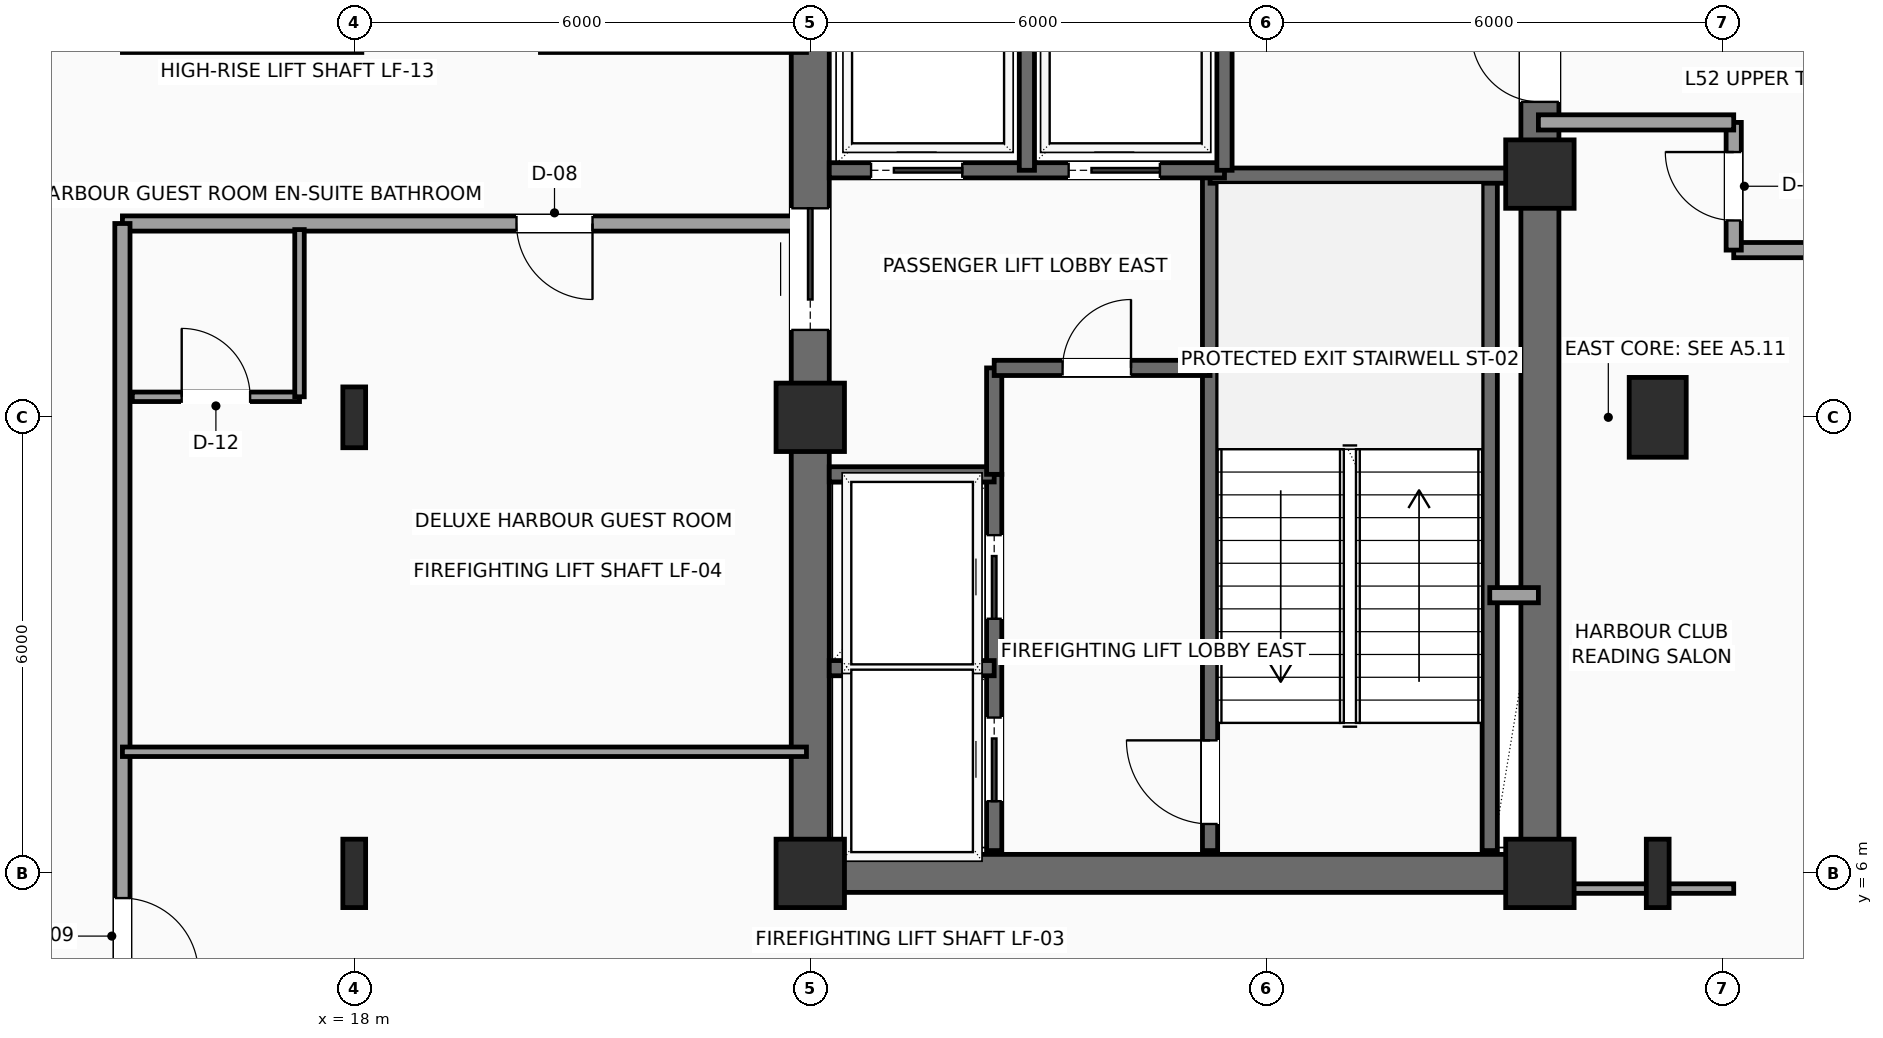
"""IFC4 building model, lengths in metres.
Left out: names, types, materials, properties, quantities, classifications, styles, units other than length and angle.
Written with IfcOpenShell. Run it as: python <this file> out.ifc"""

import sys

from ifc_helpers import new_model, si_unit, direction, frame, frame_2d, origin, origin_2d, place, context, subcontext, project, spatial, rectangle, i_section, extrude, element, fill, save


model = new_model("IFC4")
c1 = context("Model", 3, precision=1e-05, world=origin(), true_north=direction((0.0, 1.0)))
c2 = subcontext(c1, "Body", "Model", "MODEL_VIEW")
j1 = project(units=[si_unit("LENGTHUNIT", "METRE"), si_unit("PLANEANGLEUNIT", "RADIAN")], contexts=[c1])
p1 = place(None, origin())
s1 = spatial("IfcSite", under=j1, at=p1, CompositionType="ELEMENT")
p2 = place(p1, origin())
s2 = spatial("IfcBuilding", under=s1, at=p2, CompositionType="ELEMENT")
p3 = place(p2, frame((0.0, 0.0, 212.4)))
s3 = spatial("IfcBuildingStorey", under=s2, at=p3, CompositionType="ELEMENT", Elevation=212.4)
for number, where, z_axis, x_axis in (
    (1, (24.0, 6.0, 0.0), (0.0, 0.0, 1.0), (1.0, 0.0, 0.0)),
    (2, (24.0, 12.0, 0.0), (0.0, 0.0, 1.0), (1.0, 0.0, 0.0)),
    (3, (33.6, 6.0, 0.0), (0.0, 0.0, 1.0), (1.0, 0.0, 0.0)),
    (4, (33.6, 15.2, 0.0), (0.0, 0.0, 1.0), (1.0, 0.0, 0.0)),
):
    element("IfcColumn", number, at=place(p3, frame(where, z_axis=z_axis, x_axis=x_axis)), inside=s3, PredefinedType="COLUMN", context=c2, shape_type="SweptSolid", body=[
        extrude(rectangle(XDim=0.9, YDim=0.9, at=origin_2d()), origin(), (0.0, 0.0, 1.0), 3.75),
    ])
p4 = place(p3, frame((18.0, 6.0, 0.0), z_axis=(0.0, 0.0, 1.0), x_axis=(1.0, 0.0, 0.0)))
e5 = element("IfcColumn", 5, at=p4, inside=s3, PredefinedType="COLUMN", context=c2, shape_type="SweptSolid", body=[
    extrude(i_section(OverallWidth=0.3, OverallDepth=0.9, WebThickness=0.019, FlangeThickness=0.035, FilletRadius=0.03, at=origin_2d()), origin(), (0.0, 0.0, 1.0), 3.75),
])
p5 = place(p3, frame((18.0, 12.0, 0.0), z_axis=(0.0, 0.0, 1.0), x_axis=(1.0, 0.0, 0.0)))
e6 = element("IfcColumn", 6, at=p5, inside=s3, PredefinedType="COLUMN", context=c2, shape_type="SweptSolid", body=[
    extrude(i_section(OverallWidth=0.3, OverallDepth=0.8, WebThickness=0.018, FlangeThickness=0.033, FilletRadius=0.03, at=origin_2d()), origin(), (0.0, 0.0, 1.0), 3.75),
])
p6 = place(p3, frame((35.15, 6.0, 0.0), z_axis=(0.0, 0.0, 1.0), x_axis=(1.0, 0.0, 0.0)))
e7 = element("IfcColumn", 7, at=p6, inside=s3, PredefinedType="COLUMN", context=c2, shape_type="SweptSolid", body=[
    extrude(i_section(OverallWidth=0.3, OverallDepth=0.9, WebThickness=0.019, FlangeThickness=0.035, FilletRadius=0.03, at=origin_2d()), origin(), (0.0, 0.0, 1.0), 3.75),
])
p7 = place(p3, frame((35.15, 12.0, 0.0), z_axis=(0.0, 0.0, 1.0), x_axis=(1.0, 0.0, 0.0)))
e8 = element("IfcColumn", 8, at=p7, inside=s3, PredefinedType="COLUMN", context=c2, shape_type="SweptSolid", body=[
    extrude(rectangle(XDim=0.75, YDim=1.05, at=origin_2d()), origin(), (0.0, 0.0, 1.0), 3.75),
])
p8 = place(p3, frame((24.0, 6.0, 0.0), z_axis=(0.0, 0.0, 1.0), x_axis=(1.0, 0.0, 0.0)))
e9 = element("IfcWall", 9, at=p8, inside=s3, PredefinedType="SHEAR", context=c2, shape_type="SweptSolid", body=[
    extrude(rectangle(XDim=9.6, YDim=0.5, at=frame_2d((4.8, 0.0))), origin(), (0.0, 0.0, 1.0), 3.54),
])
p9 = place(p3, frame((24.0, 6.0, 0.0), z_axis=(0.0, 0.0, 1.0), x_axis=(0.0, 1.0, 0.0)))
e10 = element("IfcWall", 10, at=p9, inside=s3, PredefinedType="SHEAR", context=c2, shape_type="SweptSolid", body=[
    extrude(rectangle(XDim=12.0, YDim=0.5, at=frame_2d((6.0, 0.0))), origin(), (0.0, 0.0, 1.0), 3.54),
])
p10 = place(p9, frame((7.15, 0.0, 0.0)))
e11 = element("IfcOpeningElement", 11, at=p10, cuts=e10, PredefinedType="OPENING", context=c2, shape_type="SweptSolid", body=[
    extrude(rectangle(XDim=1.6, YDim=2.3, at=frame_2d((0.8, 1.15))), frame((0.0, 0.26, 0.0), z_axis=(0.0, -1.0, 0.0), x_axis=(1.0, 0.0, 0.0)), (0.0, 0.0, 1.0), 0.52),
])
p11 = place(p3, frame((33.6, 6.0, 0.0), z_axis=(0.0, 0.0, 1.0), x_axis=(0.0, 1.0, 0.0)))
e12 = element("IfcWall", 12, at=p11, inside=s3, PredefinedType="SHEAR", context=c2, shape_type="SweptSolid", body=[
    extrude(rectangle(XDim=12.0, YDim=0.5, at=frame_2d((6.0, 0.0))), origin(), (0.0, 0.0, 1.0), 3.54),
])
p12 = place(p11, frame((10.15, 0.0, 0.0)))
e13 = element("IfcOpeningElement", 13, at=p12, cuts=e12, PredefinedType="OPENING", context=c2, shape_type="SweptSolid", body=[
    extrude(rectangle(XDim=0.9, YDim=2.15, at=frame_2d((0.45, 1.075))), frame((0.0, 0.26, 0.0), z_axis=(0.0, -1.0, 0.0), x_axis=(1.0, 0.0, 0.0)), (0.0, 0.0, 1.0), 0.52),
])
p13 = place(p3, frame((29.26, 6.3, 0.0), z_axis=(0.0, 0.0, 1.0), x_axis=(0.0, 1.0, 0.0)))
e14 = element("IfcWall", 14, at=p13, inside=s3, PredefinedType="SHEAR", context=c2, shape_type="SweptSolid", body=[
    extrude(rectangle(XDim=8.88, YDim=0.2, at=frame_2d((4.44, 0.0))), origin(), (0.0, 0.0, 1.0), 3.54),
])
p14 = place(p13, frame((0.35, 0.0, 0.0)))
e15 = element("IfcOpeningElement", 15, at=p14, cuts=e14, PredefinedType="OPENING", context=c2, shape_type="SweptSolid", body=[
    extrude(rectangle(XDim=1.1, YDim=2.2, at=frame_2d((0.55, 1.1))), frame((0.0, 0.11, 0.0), z_axis=(0.0, -1.0, 0.0), x_axis=(1.0, 0.0, 0.0)), (0.0, 0.0, 1.0), 0.22),
])
p15 = place(p3, frame((32.94, 6.3, 0.0), z_axis=(0.0, 0.0, 1.0), x_axis=(0.0, 1.0, 0.0)))
e16 = element("IfcWall", 16, at=p15, inside=s3, PredefinedType="SHEAR", context=c2, shape_type="SweptSolid", body=[
    extrude(rectangle(XDim=8.88, YDim=0.2, at=frame_2d((4.44, 0.0))), origin(), (0.0, 0.0, 1.0), 3.54),
])
p16 = place(p3, frame((29.26, 15.18, 0.0), z_axis=(0.0, 0.0, 1.0), x_axis=(1.0, 0.0, 0.0)))
e17 = element("IfcWall", 17, at=p16, inside=s3, PredefinedType="SHEAR", context=c2, shape_type="SweptSolid", body=[
    extrude(rectangle(XDim=4.04, YDim=0.2, at=frame_2d((2.02, 0.0))), origin(), (0.0, 0.0, 1.0), 3.54),
])
p17 = place(p3, frame((26.42, 6.3, 0.0), z_axis=(0.0, 0.0, 1.0), x_axis=(0.0, 1.0, 0.0)))
e18 = element("IfcWall", 18, at=p17, inside=s3, PredefinedType="SHEAR", context=c2, shape_type="SweptSolid", body=[
    extrude(rectangle(XDim=4.95, YDim=0.2, at=frame_2d((2.475, 0.0))), origin(), (0.0, 0.0, 1.0), 3.54),
])
p18 = place(p17, frame((0.65, 0.0, 0.0)))
e19 = element("IfcOpeningElement", 19, at=p18, cuts=e18, PredefinedType="OPENING", context=c2, shape_type="SweptSolid", body=[
    extrude(rectangle(XDim=1.1, YDim=2.2, at=frame_2d((0.55, 1.1))), frame((0.0, 0.11, 0.0), z_axis=(0.0, -1.0, 0.0), x_axis=(1.0, 0.0, 0.0)), (0.0, 0.0, 1.0), 0.22),
])
p19 = place(p17, frame((3.05, 0.0, 0.0)))
e20 = element("IfcOpeningElement", 20, at=p19, cuts=e18, PredefinedType="OPENING", context=c2, shape_type="SweptSolid", body=[
    extrude(rectangle(XDim=1.1, YDim=2.2, at=frame_2d((0.55, 1.1))), frame((0.0, 0.11, 0.0), z_axis=(0.0, -1.0, 0.0), x_axis=(1.0, 0.0, 0.0)), (0.0, 0.0, 1.0), 0.22),
])
for number, where, z_axis, x_axis in (
    (21, (24.25, 8.7, 0.0), (0.0, 0.0, 1.0), (1.0, 0.0, 0.0)),
    (22, (24.25, 11.25, 0.0), (0.0, 0.0, 1.0), (1.0, 0.0, 0.0)),
):
    element("IfcWall", number, at=place(p3, frame(where, z_axis=z_axis, x_axis=x_axis)), inside=s3, PredefinedType="SHEAR", context=c2, shape_type="SweptSolid", body=[
        extrude(rectangle(XDim=2.17, YDim=0.2, at=frame_2d((1.085, 0.0))), origin(), (0.0, 0.0, 1.0), 3.54),
    ])
p20 = place(p3, frame((26.42, 11.25, 0.0), z_axis=(0.0, 0.0, 1.0), x_axis=(0.0, 1.0, 0.0)))
e23 = element("IfcWall", 23, at=p20, inside=s3, PredefinedType="SHEAR", context=c2, shape_type="SweptSolid", body=[
    extrude(rectangle(XDim=1.4, YDim=0.2, at=frame_2d((0.7, 0.0))), origin(), (0.0, 0.0, 1.0), 3.54),
])
p21 = place(p3, frame((26.42, 12.65, 0.0), z_axis=(0.0, 0.0, 1.0), x_axis=(1.0, 0.0, 0.0)))
e24 = element("IfcWall", 24, at=p21, inside=s3, PredefinedType="SHEAR", context=c2, shape_type="SweptSolid", body=[
    extrude(rectangle(XDim=2.84, YDim=0.2, at=frame_2d((1.42, 0.0))), origin(), (0.0, 0.0, 1.0), 3.54),
])
p22 = place(p21, frame((0.9, 0.0, 0.0)))
e25 = element("IfcOpeningElement", 25, at=p22, cuts=e24, PredefinedType="OPENING", context=c2, shape_type="SweptSolid", body=[
    extrude(rectangle(XDim=0.9, YDim=2.15, at=frame_2d((0.45, 1.075))), frame((0.0, 0.11, 0.0), z_axis=(0.0, -1.0, 0.0), x_axis=(1.0, 0.0, 0.0)), (0.0, 0.0, 1.0), 0.22),
])
p23 = place(p3, frame((32.94, 9.66, 0.0), z_axis=(0.0, 0.0, 1.0), x_axis=(1.0, 0.0, 0.0)))
e26 = element("IfcWall", 26, at=p23, inside=s3, PredefinedType="SOLIDWALL", context=c2, shape_type="SweptSolid", body=[
    extrude(rectangle(XDim=0.64, YDim=0.2, at=frame_2d((0.32, 0.0))), origin(), (0.0, 0.0, 1.0), 3.54),
])
p24 = place(p3, frame((24.25, 15.25, 0.0), z_axis=(0.0, 0.0, 1.0), x_axis=(1.0, 0.0, 0.0)))
e27 = element("IfcWall", 27, at=p24, inside=s3, PredefinedType="SHEAR", context=c2, shape_type="SweptSolid", body=[
    extrude(rectangle(XDim=5.2, YDim=0.2, at=frame_2d((2.6, 0.0))), origin(), (0.0, 0.0, 1.0), 3.54),
])
p25 = place(p24, frame((0.55, 0.0, 0.0)))
e28 = element("IfcOpeningElement", 28, at=p25, cuts=e27, PredefinedType="OPENING", context=c2, shape_type="SweptSolid", body=[
    extrude(rectangle(XDim=1.2, YDim=2.2, at=frame_2d((0.6, 1.1))), frame((0.0, 0.11, 0.0), z_axis=(0.0, -1.0, 0.0), x_axis=(1.0, 0.0, 0.0)), (0.0, 0.0, 1.0), 0.22),
])
p26 = place(p24, frame((3.15, 0.0, 0.0)))
e29 = element("IfcOpeningElement", 29, at=p26, cuts=e27, PredefinedType="OPENING", context=c2, shape_type="SweptSolid", body=[
    extrude(rectangle(XDim=1.2, YDim=2.2, at=frame_2d((0.6, 1.1))), frame((0.0, 0.11, 0.0), z_axis=(0.0, -1.0, 0.0), x_axis=(1.0, 0.0, 0.0)), (0.0, 0.0, 1.0), 0.22),
])
p27 = place(p3, frame((26.85, 15.25, 0.0), z_axis=(0.0, 0.0, 1.0), x_axis=(0.0, 1.0, 0.0)))
e30 = element("IfcWall", 30, at=p27, inside=s3, PredefinedType="SHEAR", context=c2, shape_type="SweptSolid", body=[
    extrude(rectangle(XDim=2.4, YDim=0.2, at=frame_2d((1.2, 0.0))), origin(), (0.0, 0.0, 1.0), 3.54),
])
p28 = place(p3, frame((29.45, 15.25, 0.0), z_axis=(0.0, 0.0, 1.0), x_axis=(0.0, 1.0, 0.0)))
e31 = element("IfcWall", 31, at=p28, inside=s3, PredefinedType="SHEAR", context=c2, shape_type="SweptSolid", body=[
    extrude(rectangle(XDim=2.45, YDim=0.2, at=frame_2d((1.225, 0.0))), origin(), (0.0, 0.0, 1.0), 3.54),
])
p29 = place(p3, frame((14.95, 16.9, 0.0), z_axis=(0.0, 0.0, 1.0), x_axis=(1.0, 0.0, 0.0)))
e32 = element("IfcWall", 32, at=p29, inside=s3, PredefinedType="PARTITIONING", context=c2, shape_type="SweptSolid", body=[
    extrude(rectangle(XDim=3.15, YDim=0.2, at=frame_2d((1.575, 0.0))), origin(), (0.0, 0.0, 1.0), 3.54),
])
p30 = place(p3, frame((38.55, 14.2, 0.0), z_axis=(0.0, 0.0, 1.0), x_axis=(-1.0, 0.0, 0.0)))
e33 = element("IfcWall", 33, at=p30, inside=s3, PredefinedType="PARTITIONING", context=c2, shape_type="SweptSolid", body=[
    extrude(rectangle(XDim=2.4, YDim=0.2, at=frame_2d((1.2, 0.0))), origin(), (0.0, 0.0, 1.0), 3.54),
])
p31 = place(p3, frame((36.15, 14.2, 0.0), z_axis=(0.0, 0.0, 1.0), x_axis=(0.0, 1.0, 0.0)))
e34 = element("IfcWall", 34, at=p31, inside=s3, PredefinedType="PARTITIONING", context=c2, shape_type="SweptSolid", body=[
    extrude(rectangle(XDim=1.68, YDim=0.2, at=frame_2d((0.84, 0.0))), origin(), (0.0, 0.0, 1.0), 3.54),
])
p32 = place(p31, frame((0.39, 0.0, 0.0)))
e35 = element("IfcOpeningElement", 35, at=p32, cuts=e34, PredefinedType="OPENING", context=c2, shape_type="SweptSolid", body=[
    extrude(rectangle(XDim=0.9, YDim=2.1, at=frame_2d((0.45, 1.05))), frame((0.0, 0.11, 0.0), z_axis=(0.0, -1.0, 0.0), x_axis=(1.0, 0.0, 0.0)), (0.0, 0.0, 1.0), 0.22),
])
p33 = place(p3, frame((36.15, 15.88, 0.0), z_axis=(0.0, 0.0, 1.0), x_axis=(-1.0, 0.0, 0.0)))
e36 = element("IfcWall", 36, at=p33, inside=s3, PredefinedType="PARTITIONING", context=c2, shape_type="SweptSolid", body=[
    extrude(rectangle(XDim=2.57, YDim=0.2, at=frame_2d((1.285, 0.0))), origin(), (0.0, 0.0, 1.0), 3.54),
])
p34 = place(p3, frame((20.45, 16.9, 0.0), z_axis=(0.0, 0.0, 1.0), x_axis=(1.0, 0.0, 0.0)))
e37 = element("IfcWall", 37, at=p34, inside=s3, PredefinedType="PARTITIONING", context=c2, shape_type="SweptSolid", body=[
    extrude(rectangle(XDim=3.5, YDim=0.2, at=frame_2d((1.75, 0.0))), origin(), (0.0, 0.0, 1.0), 3.54),
])
p35 = place(p3, frame((23.95, 14.55, 0.0), z_axis=(0.0, 0.0, 1.0), x_axis=(-1.0, 0.0, 0.0)))
e38 = element("IfcWall", 38, at=p35, inside=s3, PredefinedType="PARTITIONING", context=c2, shape_type="SweptSolid", body=[
    extrude(rectangle(XDim=9.0, YDim=0.2, at=frame_2d((4.5, 0.0))), origin(), (0.0, 0.0, 1.0), 3.54),
])
p36 = place(p35, frame((2.815, 0.0, 0.0)))
e39 = element("IfcOpeningElement", 39, at=p36, cuts=e38, PredefinedType="OPENING", context=c2, shape_type="SweptSolid", body=[
    extrude(rectangle(XDim=1.0, YDim=2.2, at=frame_2d((0.5, 1.1))), frame((0.0, 0.11, 0.0), z_axis=(0.0, -1.0, 0.0), x_axis=(1.0, 0.0, 0.0)), (0.0, 0.0, 1.0), 0.22),
])
p37 = place(p3, frame((14.95, 14.55, 0.0), z_axis=(0.0, 0.0, 1.0), x_axis=(0.0, -1.0, 0.0)))
e40 = element("IfcWall", 40, at=p37, inside=s3, PredefinedType="PARTITIONING", context=c2, shape_type="SweptSolid", body=[
    extrude(rectangle(XDim=12.75, YDim=0.2, at=frame_2d((6.375, 0.0))), origin(), (0.0, 0.0, 1.0), 3.54),
])
p38 = place(p37, frame((8.875, 0.0, 0.0)))
e41 = element("IfcOpeningElement", 41, at=p38, cuts=e40, PredefinedType="OPENING", context=c2, shape_type="SweptSolid", body=[
    extrude(rectangle(XDim=1.0, YDim=2.2, at=frame_2d((0.5, 1.1))), frame((0.0, 0.11, 0.0), z_axis=(0.0, -1.0, 0.0), x_axis=(1.0, 0.0, 0.0)), (0.0, 0.0, 1.0), 0.22),
])
p39 = place(p3, frame((33.65, 5.8, 0.0), z_axis=(0.0, 0.0, 1.0), x_axis=(1.0, 0.0, 0.0)))
e42 = element("IfcWall", 42, at=p39, inside=s3, PredefinedType="PARTITIONING", context=c2, shape_type="SweptSolid", body=[
    extrude(rectangle(XDim=2.5, YDim=0.125, at=frame_2d((1.25, 0.0))), origin(), (0.0, 0.0, 1.0), 3.132),
])
p40 = place(p3, frame((14.95, 7.6, 0.0), z_axis=(0.0, 0.0, 1.0), x_axis=(1.0, 0.0, 0.0)))
e43 = element("IfcWall", 43, at=p40, inside=s3, PredefinedType="PARTITIONING", context=c2, shape_type="SweptSolid", body=[
    extrude(rectangle(XDim=9.0, YDim=0.125, at=frame_2d((4.5, 0.0))), origin(), (0.0, 0.0, 1.0), 3.54),
])
p41 = place(p3, frame((15.08, 12.27, 0.0), z_axis=(0.0, 0.0, 1.0), x_axis=(1.0, 0.0, 0.0)))
e44 = element("IfcWall", 44, at=p41, inside=s3, PredefinedType="PARTITIONING", context=c2, shape_type="SweptSolid", body=[
    extrude(rectangle(XDim=2.2, YDim=0.125, at=frame_2d((1.1, 0.0))), origin(), (0.0, 0.0, 1.0), 3.132),
])
p42 = place(p41, frame((0.65, 0.0, 0.0)))
e45 = element("IfcOpeningElement", 45, at=p42, cuts=e44, PredefinedType="OPENING", context=c2, shape_type="SweptSolid", body=[
    extrude(rectangle(XDim=0.9, YDim=2.1, at=frame_2d((0.45, 1.05))), frame((0.0, 0.073, 0.0), z_axis=(0.0, -1.0, 0.0), x_axis=(1.0, 0.0, 0.0)), (0.0, 0.0, 1.0), 0.145),
])
p43 = place(p3, frame((17.28, 12.27, 0.0), z_axis=(0.0, 0.0, 1.0), x_axis=(0.0, 1.0, 0.0)))
e46 = element("IfcWall", 46, at=p43, inside=s3, PredefinedType="PARTITIONING", context=c2, shape_type="SweptSolid", body=[
    extrude(rectangle(XDim=2.2, YDim=0.125, at=frame_2d((1.1, 0.0))), origin(), (0.0, 0.0, 1.0), 3.54),
])
p44 = place(p10, origin())
e47 = element("IfcDoor", 47, at=p44, inside=s3, OperationType="DOUBLE_DOOR_SLIDING", PredefinedType="DOOR", context=c2, shape_type="SweptSolid", body=[
    extrude(rectangle(XDim=1.6, YDim=2.3, at=frame_2d((0.8, 1.15))), frame((0.0, 0.025, 0.0), z_axis=(0.0, -1.0, 0.0), x_axis=(1.0, 0.0, 0.0)), (0.0, 0.0, 1.0), 0.05),
])
fill(e11, e47)
p45 = place(p12, origin())
e48 = element("IfcDoor", 48, at=p45, inside=s3, OperationType="SINGLE_SWING_RIGHT", PredefinedType="DOOR", context=c2, shape_type="SweptSolid", body=[
    extrude(rectangle(XDim=0.9, YDim=2.15, at=frame_2d((0.45, 1.075))), frame((0.0, 0.025, 0.0), z_axis=(0.0, -1.0, 0.0), x_axis=(1.0, 0.0, 0.0)), (0.0, 0.0, 1.0), 0.05),
])
fill(e13, e48)
p46 = place(p14, origin())
e49 = element("IfcDoor", 49, at=p46, inside=s3, OperationType="SINGLE_SWING_RIGHT", PredefinedType="DOOR", context=c2, shape_type="SweptSolid", body=[
    extrude(rectangle(XDim=1.1, YDim=2.2, at=frame_2d((0.55, 1.1))), frame((0.0, 0.025, 0.0), z_axis=(0.0, -1.0, 0.0), x_axis=(1.0, 0.0, 0.0)), (0.0, 0.0, 1.0), 0.05),
])
fill(e15, e49)
p47 = place(p18, origin())
e50 = element("IfcDoor", 50, at=p47, inside=s3, OperationType="SLIDING_TO_LEFT", PredefinedType="DOOR", context=c2, shape_type="SweptSolid", body=[
    extrude(rectangle(XDim=1.1, YDim=2.2, at=frame_2d((0.55, 1.1))), frame((0.0, 0.025, 0.0), z_axis=(0.0, -1.0, 0.0), x_axis=(1.0, 0.0, 0.0)), (0.0, 0.0, 1.0), 0.05),
])
fill(e19, e50)
p48 = place(p19, origin())
e51 = element("IfcDoor", 51, at=p48, inside=s3, OperationType="SLIDING_TO_LEFT", PredefinedType="DOOR", context=c2, shape_type="SweptSolid", body=[
    extrude(rectangle(XDim=1.1, YDim=2.2, at=frame_2d((0.55, 1.1))), frame((0.0, 0.025, 0.0), z_axis=(0.0, -1.0, 0.0), x_axis=(1.0, 0.0, 0.0)), (0.0, 0.0, 1.0), 0.05),
])
fill(e20, e51)
p49 = place(p22, origin())
e52 = element("IfcDoor", 52, at=p49, inside=s3, OperationType="SINGLE_SWING_RIGHT", PredefinedType="DOOR", context=c2, shape_type="SweptSolid", body=[
    extrude(rectangle(XDim=0.9, YDim=2.15, at=frame_2d((0.45, 1.075))), frame((0.0, 0.025, 0.0), z_axis=(0.0, -1.0, 0.0), x_axis=(1.0, 0.0, 0.0)), (0.0, 0.0, 1.0), 0.05),
])
fill(e25, e52)
p50 = place(p25, origin())
e53 = element("IfcDoor", 53, at=p50, inside=s3, OperationType="SLIDING_TO_RIGHT", PredefinedType="DOOR", context=c2, shape_type="SweptSolid", body=[
    extrude(rectangle(XDim=1.2, YDim=2.2, at=frame_2d((0.6, 1.1))), frame((0.0, 0.025, 0.0), z_axis=(0.0, -1.0, 0.0), x_axis=(1.0, 0.0, 0.0)), (0.0, 0.0, 1.0), 0.05),
])
fill(e28, e53)
p51 = place(p26, origin())
e54 = element("IfcDoor", 54, at=p51, inside=s3, OperationType="SLIDING_TO_RIGHT", PredefinedType="DOOR", context=c2, shape_type="SweptSolid", body=[
    extrude(rectangle(XDim=1.2, YDim=2.2, at=frame_2d((0.6, 1.1))), frame((0.0, 0.025, 0.0), z_axis=(0.0, -1.0, 0.0), x_axis=(1.0, 0.0, 0.0)), (0.0, 0.0, 1.0), 0.05),
])
fill(e29, e54)
p52 = place(p32, origin())
e55 = element("IfcDoor", 55, at=p52, inside=s3, OperationType="SINGLE_SWING_RIGHT", PredefinedType="DOOR", context=c2, shape_type="SweptSolid", body=[
    extrude(rectangle(XDim=0.9, YDim=2.1, at=frame_2d((0.45, 1.05))), frame((0.0, 0.025, 0.0), z_axis=(0.0, -1.0, 0.0), x_axis=(1.0, 0.0, 0.0)), (0.0, 0.0, 1.0), 0.05),
])
fill(e35, e55)
p53 = place(p36, origin())
e56 = element("IfcDoor", 56, at=p53, inside=s3, OperationType="SINGLE_SWING_LEFT", PredefinedType="DOOR", context=c2, shape_type="SweptSolid", body=[
    extrude(rectangle(XDim=1.0, YDim=2.2, at=frame_2d((0.5, 1.1))), frame((0.0, 0.025, 0.0), z_axis=(0.0, -1.0, 0.0), x_axis=(1.0, 0.0, 0.0)), (0.0, 0.0, 1.0), 0.05),
])
fill(e39, e56)
p54 = place(p38, origin())
e57 = element("IfcDoor", 57, at=p54, inside=s3, OperationType="SINGLE_SWING_RIGHT", PredefinedType="DOOR", context=c2, shape_type="SweptSolid", body=[
    extrude(rectangle(XDim=1.0, YDim=2.2, at=frame_2d((0.5, 1.1))), frame((0.0, 0.025, 0.0), z_axis=(0.0, -1.0, 0.0), x_axis=(1.0, 0.0, 0.0)), (0.0, 0.0, 1.0), 0.05),
])
fill(e41, e57)
p55 = place(p42, origin())
e58 = element("IfcDoor", 58, at=p55, inside=s3, OperationType="SINGLE_SWING_LEFT", PredefinedType="DOOR", context=c2, shape_type="SweptSolid", body=[
    extrude(rectangle(XDim=0.9, YDim=2.1, at=frame_2d((0.45, 1.05))), frame((0.0, 0.025, 0.0), z_axis=(0.0, -1.0, 0.0), x_axis=(1.0, 0.0, 0.0)), (0.0, 0.0, 1.0), 0.05),
])
fill(e45, e58)
save(model, sys.argv[1])
